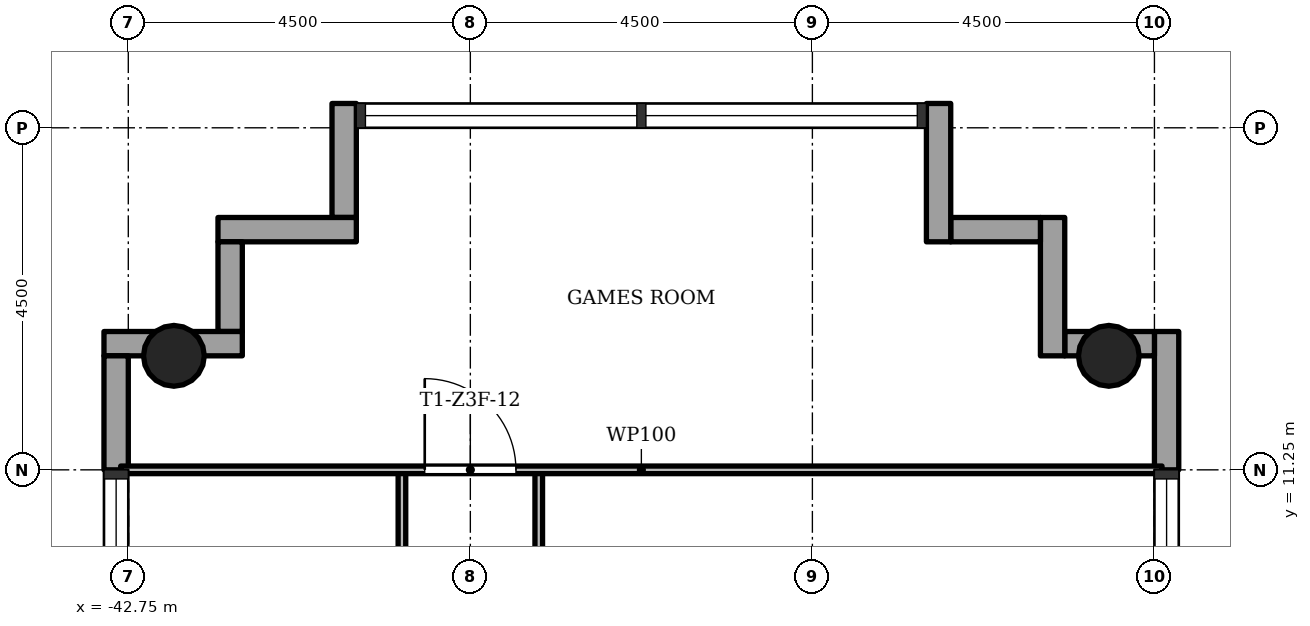
"""IFC4 building model, lengths in metres.
Left out: names, types, materials, properties, quantities, classifications, styles, units other than length and angle.
Written with IfcOpenShell. Run it as: python <this file> out.ifc"""

import sys

from ifc_helpers import new_model, si_unit, direction, frame, frame_2d, origin, origin_2d, place, context, subcontext, project, spatial, rectangle, hollow_circle, extrude, element, fill, save


model = new_model("IFC4")
c1 = context("Model", 3, precision=1e-05, world=origin(), true_north=direction((0.0, 1.0)))
c2 = subcontext(c1, "Body", "Model", "MODEL_VIEW")
j1 = project(units=[si_unit("LENGTHUNIT", "METRE"), si_unit("PLANEANGLEUNIT", "RADIAN")], contexts=[c1])
p1 = place(None, origin())
s1 = spatial("IfcSite", under=j1, at=p1, CompositionType="ELEMENT")
p2 = place(p1, origin())
s2 = spatial("IfcBuilding", under=s1, at=p2, CompositionType="ELEMENT")
p3 = place(p2, frame((0.0, 0.0, 167.7)))
s3 = spatial("IfcBuildingStorey", under=s2, at=p3, CompositionType="ELEMENT", Elevation=167.7)
for number, where, z_axis, x_axis in (
    (1, (-29.85, 12.75, 0.0), (0.0, 0.0, 1.0), (1.0, 0.0, 0.0)),
    (2, (-42.15, 12.75, 0.0), (0.0, 0.0, 1.0), (1.0, 0.0, 0.0)),
):
    element("IfcColumn", number, at=place(p3, frame(where, z_axis=z_axis, x_axis=x_axis)), inside=s3, PredefinedType="COLUMN", context=c2, shape_type="SweptSolid", body=[
        extrude(hollow_circle(Radius=0.4, WallThickness=0.028, at=origin_2d()), origin(), (0.0, 0.0, 1.0), 3.4),
    ])
p4 = place(p3, frame((-29.09, 11.25, -0.3), z_axis=(0.0, 0.0, 1.0), x_axis=(0.0, 1.0, 0.0)))
e3 = element("IfcWall", 3, at=p4, inside=s3, PredefinedType="STANDARD", context=c2, shape_type="SweptSolid", body=[
    extrude(rectangle(XDim=1.82, YDim=0.32, at=frame_2d((0.91, 0.0))), origin(), (0.0, 0.0, 1.0), 3.4),
])
p5 = place(p3, frame((-29.25, 12.91, -0.3), z_axis=(0.0, 0.0, 1.0), x_axis=(-1.0, 0.0, 0.0)))
e4 = element("IfcWall", 4, at=p5, inside=s3, PredefinedType="STANDARD", context=c2, shape_type="SweptSolid", body=[
    extrude(rectangle(XDim=1.18, YDim=0.32, at=frame_2d((0.59, 0.0))), origin(), (0.0, 0.0, 1.0), 3.4),
])
p6 = place(p3, frame((-30.59, 12.75, -0.3), z_axis=(0.0, 0.0, 1.0), x_axis=(0.0, 1.0, 0.0)))
e5 = element("IfcWall", 5, at=p6, inside=s3, PredefinedType="STANDARD", context=c2, shape_type="SweptSolid", body=[
    extrude(rectangle(XDim=1.82, YDim=0.32, at=frame_2d((0.91, 0.0))), origin(), (0.0, 0.0, 1.0), 3.4),
])
p7 = place(p3, frame((-30.75, 14.41, -0.3), z_axis=(0.0, 0.0, 1.0), x_axis=(-1.0, 0.0, 0.0)))
e6 = element("IfcWall", 6, at=p7, inside=s3, PredefinedType="STANDARD", context=c2, shape_type="SweptSolid", body=[
    extrude(rectangle(XDim=1.18, YDim=0.32, at=frame_2d((0.59, 0.0))), origin(), (0.0, 0.0, 1.0), 3.4),
])
p8 = place(p3, frame((-32.09, 14.25, -0.3), z_axis=(0.0, 0.0, 1.0), x_axis=(0.0, 1.0, 0.0)))
e7 = element("IfcWall", 7, at=p8, inside=s3, PredefinedType="STANDARD", context=c2, shape_type="SweptSolid", body=[
    extrude(rectangle(XDim=1.82, YDim=0.32, at=frame_2d((0.91, 0.0))), origin(), (0.0, 0.0, 1.0), 3.4),
])
p9 = place(p3, frame((-39.91, 16.07, -0.3), z_axis=(0.0, 0.0, 1.0), x_axis=(0.0, -1.0, 0.0)))
e8 = element("IfcWall", 8, at=p9, inside=s3, PredefinedType="STANDARD", context=c2, shape_type="SweptSolid", body=[
    extrude(rectangle(XDim=1.5, YDim=0.32, at=frame_2d((0.75, 0.0))), origin(), (0.0, 0.0, 1.0), 3.4),
])
p10 = place(p3, frame((-39.75, 14.41, -0.3), z_axis=(0.0, 0.0, 1.0), x_axis=(-1.0, 0.0, 0.0)))
e9 = element("IfcWall", 9, at=p10, inside=s3, PredefinedType="STANDARD", context=c2, shape_type="SweptSolid", body=[
    extrude(rectangle(XDim=1.82, YDim=0.32, at=frame_2d((0.91, 0.0))), origin(), (0.0, 0.0, 1.0), 3.4),
])
p11 = place(p3, frame((-41.41, 14.25, -0.3), z_axis=(0.0, 0.0, 1.0), x_axis=(0.0, -1.0, 0.0)))
e10 = element("IfcWall", 10, at=p11, inside=s3, PredefinedType="STANDARD", context=c2, shape_type="SweptSolid", body=[
    extrude(rectangle(XDim=1.18, YDim=0.32, at=frame_2d((0.59, 0.0))), origin(), (0.0, 0.0, 1.0), 3.4),
])
p12 = place(p3, frame((-41.25, 12.91, -0.3), z_axis=(0.0, 0.0, 1.0), x_axis=(-1.0, 0.0, 0.0)))
e11 = element("IfcWall", 11, at=p12, inside=s3, PredefinedType="STANDARD", context=c2, shape_type="SweptSolid", body=[
    extrude(rectangle(XDim=1.82, YDim=0.32, at=frame_2d((0.91, 0.0))), origin(), (0.0, 0.0, 1.0), 3.4),
])
p13 = place(p3, frame((-42.91, 12.75, -0.3), z_axis=(0.0, 0.0, 1.0), x_axis=(0.0, -1.0, 0.0)))
e12 = element("IfcWall", 12, at=p13, inside=s3, PredefinedType="STANDARD", context=c2, shape_type="SweptSolid", body=[
    extrude(rectangle(XDim=1.5, YDim=0.32, at=frame_2d((0.75, 0.0))), origin(), (0.0, 0.0, 1.0), 3.4),
])
p14 = place(p3, frame((-39.15, 6.75, 0.0), z_axis=(0.0, 0.0, 1.0), x_axis=(0.0, 1.0, 0.0)))
e13 = element("IfcWall", 13, at=p14, inside=s3, PredefinedType="PARTITIONING", context=c2, shape_type="SweptSolid", body=[
    extrude(rectangle(XDim=4.5, YDim=0.1, at=frame_2d((2.25, 0.0))), origin(), (0.0, 0.0, 1.0), 3.0),
])
p15 = place(p14, frame((1.8, 0.0, 0.0)))
e14 = element("IfcOpeningElement", 14, at=p15, cuts=e13, PredefinedType="OPENING", context=c2, shape_type="SweptSolid", body=[
    extrude(rectangle(XDim=0.9, YDim=2.1, at=frame_2d((0.45, 1.05))), frame((0.0, 0.06, 0.0), z_axis=(0.0, -1.0, 0.0), x_axis=(1.0, 0.0, 0.0)), (0.0, 0.0, 1.0), 0.12),
])
p16 = place(p3, frame((-37.35, 8.55, 0.0), z_axis=(0.0, 0.0, 1.0), x_axis=(0.0, 1.0, 0.0)))
e15 = element("IfcWall", 15, at=p16, inside=s3, PredefinedType="PARTITIONING", context=c2, shape_type="SweptSolid", body=[
    extrude(rectangle(XDim=2.7, YDim=0.1, at=frame_2d((1.35, 0.0))), origin(), (0.0, 0.0, 1.0), 3.0),
])
p17 = place(p16, frame((0.07, 0.0, 0.0)))
e16 = element("IfcOpeningElement", 16, at=p17, cuts=e15, PredefinedType="OPENING", context=c2, shape_type="SweptSolid", body=[
    extrude(rectangle(XDim=0.9, YDim=2.1, at=frame_2d((0.45, 1.05))), frame((0.0, 0.06, 0.0), z_axis=(0.0, -1.0, 0.0), x_axis=(1.0, 0.0, 0.0)), (0.0, 0.0, 1.0), 0.12),
])
p18 = place(p3, frame((-42.85, 11.25, 0.0), z_axis=(0.0, 0.0, 1.0), x_axis=(1.0, 0.0, 0.0)))
e17 = element("IfcWall", 17, at=p18, inside=s3, PredefinedType="PARTITIONING", context=c2, shape_type="SweptSolid", body=[
    extrude(rectangle(XDim=13.7, YDim=0.1, at=frame_2d((6.85, 0.0))), origin(), (0.0, 0.0, 1.0), 3.0),
])
p19 = place(p18, frame((4.0, 0.0, 0.0)))
e18 = element("IfcOpeningElement", 18, at=p19, cuts=e17, PredefinedType="OPENING", context=c2, shape_type="SweptSolid", body=[
    extrude(rectangle(XDim=1.2, YDim=2.1, at=frame_2d((0.6, 1.05))), frame((0.0, 0.06, 0.0), z_axis=(0.0, -1.0, 0.0), x_axis=(1.0, 0.0, 0.0)), (0.0, 0.0, 1.0), 0.12),
])
p20 = place(p19, origin())
e19 = element("IfcDoor", 19, at=p20, inside=s3, OperationType="SINGLE_SWING_RIGHT", PredefinedType="DOOR", context=c2, shape_type="SweptSolid", body=[
    extrude(rectangle(XDim=1.2, YDim=2.1, at=frame_2d((0.6, 1.05))), frame((0.0, 0.025, 0.0), z_axis=(0.0, -1.0, 0.0), x_axis=(1.0, 0.0, 0.0)), (0.0, 0.0, 1.0), 0.05),
])
fill(e18, e19)
save(model, sys.argv[1])
